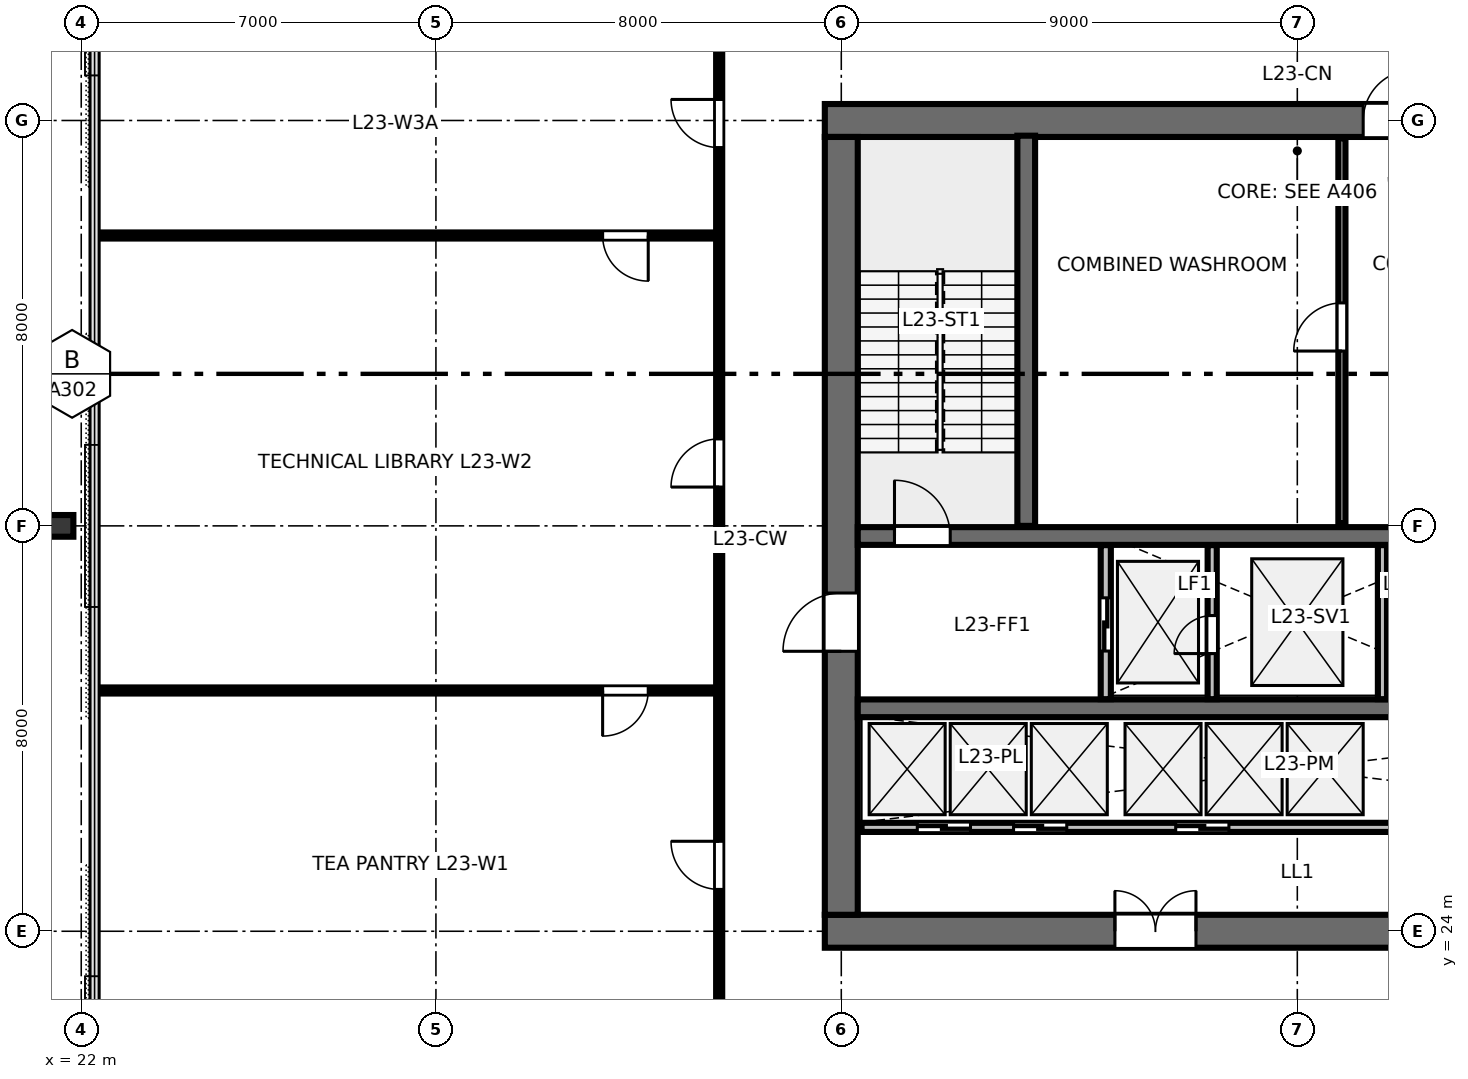
"""IFC4 building model, lengths in metres.
Left out: names, types, materials, properties, quantities, classifications, styles, units other than length and angle.
Written with IfcOpenShell. Run it as: python <this file> out.ifc"""

import sys

from ifc_helpers import new_model, si_unit, direction, frame, frame_2d, origin, origin_2d, place, context, subcontext, project, spatial, rectangle, i_section, extrude, element, fill, save


model = new_model("IFC4")
c1 = context("Model", 3, precision=1e-05, world=origin(), true_north=direction((0.0, 1.0)))
c2 = subcontext(c1, "Body", "Model", "MODEL_VIEW")
j1 = project(units=[si_unit("LENGTHUNIT", "METRE"), si_unit("PLANEANGLEUNIT", "RADIAN")], contexts=[c1])
p1 = place(None, origin())
s1 = spatial("IfcSite", under=j1, at=p1, CompositionType="ELEMENT")
p2 = place(p1, origin())
s2 = spatial("IfcBuilding", under=s1, at=p2, CompositionType="ELEMENT")
p3 = place(p2, frame((0.0, 0.0, 90.4)))
s3 = spatial("IfcBuildingStorey", under=s2, at=p3, CompositionType="ELEMENT", Elevation=90.4)
p4 = place(p3, frame((36.675, 24.0, 0.0), z_axis=(0.0, 0.0, 1.0), x_axis=(1.0, 0.0, 0.0)))
e1 = element("IfcWall", 1, at=p4, inside=s3, PredefinedType="SHEAR", context=c2, shape_type="SweptSolid", body=[
    extrude(rectangle(XDim=18.65, YDim=0.65, at=frame_2d((9.325, 0.0))), origin(), (0.0, 0.0, 1.0), 4.56),
])
p5 = place(p4, frame((5.725, 0.0, 0.0)))
e2 = element("IfcOpeningElement", 2, at=p5, cuts=e1, PredefinedType="OPENING", context=c2, shape_type="SweptSolid", body=[
    extrude(rectangle(XDim=1.6, YDim=2.15, at=frame_2d((0.8, 1.075))), frame((0.0, 0.335, 0.0), z_axis=(0.0, -1.0, 0.0), x_axis=(1.0, 0.0, 0.0)), (0.0, 0.0, 1.0), 0.67),
])
p6 = place(p4, frame((12.125, 0.0, 0.0)))
e3 = element("IfcOpeningElement", 3, at=p6, cuts=e1, PredefinedType="OPENING", context=c2, shape_type="SweptSolid", body=[
    extrude(rectangle(XDim=1.6, YDim=2.15, at=frame_2d((0.8, 1.075))), frame((0.0, 0.335, 0.0), z_axis=(0.0, -1.0, 0.0), x_axis=(1.0, 0.0, 0.0)), (0.0, 0.0, 1.0), 0.67),
])
p7 = place(p3, frame((36.675, 40.0, 0.0), z_axis=(0.0, 0.0, 1.0), x_axis=(1.0, 0.0, 0.0)))
e4 = element("IfcWall", 4, at=p7, inside=s3, PredefinedType="SHEAR", context=c2, shape_type="SweptSolid", body=[
    extrude(rectangle(XDim=18.65, YDim=0.65, at=frame_2d((9.325, 0.0))), origin(), (0.0, 0.0, 1.0), 4.56),
])
p8 = place(p7, frame((10.625, 0.0, 0.0)))
e5 = element("IfcOpeningElement", 5, at=p8, cuts=e4, PredefinedType="OPENING", context=c2, shape_type="SweptSolid", body=[
    extrude(rectangle(XDim=1.0, YDim=2.15, at=frame_2d((0.5, 1.075))), frame((0.0, 0.335, 0.0), z_axis=(0.0, -1.0, 0.0), x_axis=(1.0, 0.0, 0.0)), (0.0, 0.0, 1.0), 0.67),
])
p9 = place(p3, frame((37.0, 24.325, 0.0), z_axis=(0.0, 0.0, 1.0), x_axis=(0.0, 1.0, 0.0)))
e6 = element("IfcWall", 6, at=p9, inside=s3, PredefinedType="SHEAR", context=c2, shape_type="SweptSolid", body=[
    extrude(rectangle(XDim=15.35, YDim=0.65, at=frame_2d((7.675, 0.0))), origin(), (0.0, 0.0, 1.0), 4.56),
])
p10 = place(p9, frame((5.2, 0.0, 0.0)))
e7 = element("IfcOpeningElement", 7, at=p10, cuts=e6, PredefinedType="OPENING", context=c2, shape_type="SweptSolid", body=[
    extrude(rectangle(XDim=1.15, YDim=2.15, at=frame_2d((0.575, 1.075))), frame((0.0, 0.335, 0.0), z_axis=(0.0, -1.0, 0.0), x_axis=(1.0, 0.0, 0.0)), (0.0, 0.0, 1.0), 0.67),
])
p11 = place(p3, frame((37.325, 31.8, 0.0), z_axis=(0.0, 0.0, 1.0), x_axis=(1.0, 0.0, 0.0)))
e8 = element("IfcWall", 8, at=p11, inside=s3, PredefinedType="SHEAR", context=c2, shape_type="SweptSolid", body=[
    extrude(rectangle(XDim=17.35, YDim=0.35, at=frame_2d((8.675, 0.0))), origin(), (0.0, 0.0, 1.0), 4.56),
])
p12 = place(p11, frame((0.725, 0.0, 0.0)))
e9 = element("IfcOpeningElement", 9, at=p12, cuts=e8, PredefinedType="OPENING", context=c2, shape_type="SweptSolid", body=[
    extrude(rectangle(XDim=1.1, YDim=2.15, at=frame_2d((0.55, 1.075))), frame((0.0, 0.185, 0.0), z_axis=(0.0, -1.0, 0.0), x_axis=(1.0, 0.0, 0.0)), (0.0, 0.0, 1.0), 0.37),
])
p13 = place(p11, frame((14.625, 0.0, 0.0)))
e10 = element("IfcOpeningElement", 10, at=p13, cuts=e8, PredefinedType="OPENING", context=c2, shape_type="SweptSolid", body=[
    extrude(rectangle(XDim=1.1, YDim=2.15, at=frame_2d((0.55, 1.075))), frame((0.0, 0.185, 0.0), z_axis=(0.0, -1.0, 0.0), x_axis=(1.0, 0.0, 0.0)), (0.0, 0.0, 1.0), 0.37),
])
p14 = place(p3, frame((37.325, 28.4, 0.0), z_axis=(0.0, 0.0, 1.0), x_axis=(1.0, 0.0, 0.0)))
e11 = element("IfcWall", 11, at=p14, inside=s3, PredefinedType="SHEAR", context=c2, shape_type="SweptSolid", body=[
    extrude(rectangle(XDim=17.35, YDim=0.35, at=frame_2d((8.675, 0.0))), origin(), (0.0, 0.0, 1.0), 4.56),
])
p15 = place(p3, frame((21.603, 32.0, 0.0), z_axis=(0.047509227082, 0.0, 0.998870799124), x_axis=(-0.998870799124, 0.0, 0.047509227082)))
e12 = element("IfcColumn", 12, at=p15, inside=s3, PredefinedType="COLUMN", context=c2, shape_type="SweptSolid", body=[
    extrude(i_section(OverallWidth=0.428, OverallDepth=0.483, WebThickness=0.051, FlangeThickness=0.082, FilletRadius=0.025, at=origin_2d()), origin(), (0.0, 0.0, 1.0), 4.563),
])
p16 = place(p3, frame((40.65, 32.0, 0.0), z_axis=(0.0, 0.0, 1.0), x_axis=(0.0, 1.0, 0.0)))
e13 = element("IfcWall", 13, at=p16, inside=s3, PredefinedType="SHEAR", context=c2, shape_type="SweptSolid", body=[
    extrude(rectangle(XDim=7.7, YDim=0.35, at=frame_2d((3.85, 0.0))), origin(), (0.0, 0.0, 1.0), 4.8),
])
p17 = place(p3, frame((46.88, 32.05, 0.0), z_axis=(0.0, 0.0, 1.0), x_axis=(0.0, 1.0, 0.0)))
e14 = element("IfcWall", 14, at=p17, inside=s3, PredefinedType="PARTITIONING", context=c2, shape_type="SweptSolid", body=[
    extrude(rectangle(XDim=7.6, YDim=0.14, at=frame_2d((3.8, 0.0))), origin(), (0.0, 0.0, 1.0), 4.56),
])
p18 = place(p17, frame((3.4, 0.0, 0.0)))
e15 = element("IfcOpeningElement", 15, at=p18, cuts=e14, PredefinedType="OPENING", context=c2, shape_type="SweptSolid", body=[
    extrude(rectangle(XDim=0.95, YDim=2.15, at=frame_2d((0.475, 1.075))), frame((0.0, 0.08, 0.0), z_axis=(0.0, -1.0, 0.0), x_axis=(1.0, 0.0, 0.0)), (0.0, 0.0, 1.0), 0.16),
])
p19 = place(p3, frame((42.22, 28.58, 0.0), z_axis=(0.0, 0.0, 1.0), x_axis=(0.0, 1.0, 0.0)))
e16 = element("IfcWall", 16, at=p19, inside=s3, PredefinedType="PARTITIONING", context=c2, shape_type="SweptSolid", body=[
    extrude(rectangle(XDim=3.04, YDim=0.2, at=frame_2d((1.52, 0.0))), origin(), (0.0, 0.0, 1.0), 4.56),
])
p20 = place(p19, frame((0.95, 0.0, 0.0)))
e17 = element("IfcOpeningElement", 17, at=p20, cuts=e16, PredefinedType="OPENING", context=c2, shape_type="SweptSolid", body=[
    extrude(rectangle(XDim=1.05, YDim=2.15, at=frame_2d((0.525, 1.075))), frame((0.0, 0.11, 0.0), z_axis=(0.0, -1.0, 0.0), x_axis=(1.0, 0.0, 0.0)), (0.0, 0.0, 1.0), 0.22),
])
p21 = place(p3, frame((44.32, 28.58, 0.0), z_axis=(0.0, 0.0, 1.0), x_axis=(0.0, 1.0, 0.0)))
e18 = element("IfcWall", 18, at=p21, inside=s3, PredefinedType="PARTITIONING", context=c2, shape_type="SweptSolid", body=[
    extrude(rectangle(XDim=3.04, YDim=0.18, at=frame_2d((1.52, 0.0))), origin(), (0.0, 0.0, 1.0), 4.56),
])
p22 = place(p21, frame((0.9, 0.0, 0.0)))
e19 = element("IfcOpeningElement", 19, at=p22, cuts=e18, PredefinedType="OPENING", context=c2, shape_type="SweptSolid", body=[
    extrude(rectangle(XDim=0.75, YDim=2.0, at=frame_2d((0.375, 1.0))), frame((0.0, 0.1, 0.0), z_axis=(0.0, -1.0, 0.0), x_axis=(1.0, 0.0, 0.0)), (0.0, 0.0, 1.0), 0.2),
])
p23 = place(p3, frame((47.68, 28.58, 0.0), z_axis=(0.0, 0.0, 1.0), x_axis=(0.0, 1.0, 0.0)))
e20 = element("IfcWall", 20, at=p23, inside=s3, PredefinedType="PARTITIONING", context=c2, shape_type="SweptSolid", body=[
    extrude(rectangle(XDim=3.04, YDim=0.18, at=frame_2d((1.52, 0.0))), origin(), (0.0, 0.0, 1.0), 4.56),
])
p24 = place(p3, frame((37.4, 26.05, 0.0), z_axis=(0.0, 0.0, 1.0), x_axis=(1.0, 0.0, 0.0)))
e21 = element("IfcWall", 21, at=p24, inside=s3, PredefinedType="PARTITIONING", context=c2, shape_type="SweptSolid", body=[
    extrude(rectangle(XDim=17.2, YDim=0.18, at=frame_2d((8.6, 0.0))), origin(), (0.0, 0.0, 1.0), 4.56),
])
p25 = place(p24, frame((1.1, 0.0, 0.0)))
e22 = element("IfcOpeningElement", 22, at=p25, cuts=e21, PredefinedType="OPENING", context=c2, shape_type="SweptSolid", body=[
    extrude(rectangle(XDim=1.05, YDim=2.15, at=frame_2d((0.525, 1.075))), frame((0.0, 0.1, 0.0), z_axis=(0.0, -1.0, 0.0), x_axis=(1.0, 0.0, 0.0)), (0.0, 0.0, 1.0), 0.2),
])
p26 = place(p24, frame((3.0, 0.0, 0.0)))
e23 = element("IfcOpeningElement", 23, at=p26, cuts=e21, PredefinedType="OPENING", context=c2, shape_type="SweptSolid", body=[
    extrude(rectangle(XDim=1.05, YDim=2.15, at=frame_2d((0.525, 1.075))), frame((0.0, 0.1, 0.0), z_axis=(0.0, -1.0, 0.0), x_axis=(1.0, 0.0, 0.0)), (0.0, 0.0, 1.0), 0.2),
])
p27 = place(p24, frame((11.4, 0.0, 0.0)))
e24 = element("IfcOpeningElement", 24, at=p27, cuts=e21, PredefinedType="OPENING", context=c2, shape_type="SweptSolid", body=[
    extrude(rectangle(XDim=1.05, YDim=2.15, at=frame_2d((0.525, 1.075))), frame((0.0, 0.1, 0.0), z_axis=(0.0, -1.0, 0.0), x_axis=(1.0, 0.0, 0.0)), (0.0, 0.0, 1.0), 0.2),
])
p28 = place(p24, frame((6.2, 0.0, 0.0)))
e25 = element("IfcOpeningElement", 25, at=p28, cuts=e21, PredefinedType="OPENING", context=c2, shape_type="SweptSolid", body=[
    extrude(rectangle(XDim=1.05, YDim=2.15, at=frame_2d((0.525, 1.075))), frame((0.0, 0.1, 0.0), z_axis=(0.0, -1.0, 0.0), x_axis=(1.0, 0.0, 0.0)), (0.0, 0.0, 1.0), 0.2),
])
p29 = place(p3, frame((34.59, 28.752, 0.0), z_axis=(0.0, 0.0, 1.0), x_axis=(-1.0, 0.0, 0.0)))
e26 = element("IfcWall", 26, at=p29, inside=s3, PredefinedType="PARTITIONING", context=c2, shape_type="SweptSolid", body=[
    extrude(rectangle(XDim=12.327, YDim=0.12, at=frame_2d((6.164, 0.0))), origin(), (0.0, 0.0, 1.0), 3.84),
])
p30 = place(p29, frame((1.4, 0.0, 0.0)))
e27 = element("IfcOpeningElement", 27, at=p30, cuts=e26, PredefinedType="OPENING", context=c2, shape_type="SweptSolid", body=[
    extrude(rectangle(XDim=0.9, YDim=2.15, at=frame_2d((0.45, 1.075))), frame((0.0, 0.07, 0.0), z_axis=(0.0, -1.0, 0.0), x_axis=(1.0, 0.0, 0.0)), (0.0, 0.0, 1.0), 0.14),
])
p31 = place(p3, frame((34.59, 37.73, 0.0), z_axis=(0.0, 0.0, 1.0), x_axis=(-1.0, 0.0, 0.0)))
e28 = element("IfcWall", 28, at=p31, inside=s3, PredefinedType="PARTITIONING", context=c2, shape_type="SweptSolid", body=[
    extrude(rectangle(XDim=12.327, YDim=0.12, at=frame_2d((6.164, 0.0))), origin(), (0.0, 0.0, 1.0), 3.84),
])
p32 = place(p31, frame((1.4, 0.0, 0.0)))
e29 = element("IfcOpeningElement", 29, at=p32, cuts=e28, PredefinedType="OPENING", context=c2, shape_type="SweptSolid", body=[
    extrude(rectangle(XDim=0.9, YDim=2.15, at=frame_2d((0.45, 1.075))), frame((0.0, 0.07, 0.0), z_axis=(0.0, -1.0, 0.0), x_axis=(1.0, 0.0, 0.0)), (0.0, 0.0, 1.0), 0.14),
])
p33 = place(p3, frame((34.59, 21.65, 0.0), z_axis=(0.0, 0.0, 1.0), x_axis=(0.0, 1.0, 0.0)))
e30 = element("IfcWall", 30, at=p33, inside=s3, PredefinedType="PARTITIONING", context=c2, shape_type="SweptSolid", body=[
    extrude(rectangle(XDim=20.7, YDim=0.12, at=frame_2d((10.35, 0.0))), origin(), (0.0, 0.0, 1.0), 3.84),
])
p34 = place(p33, frame((3.176, 0.0, 0.0)))
e31 = element("IfcOpeningElement", 31, at=p34, cuts=e30, PredefinedType="OPENING", context=c2, shape_type="SweptSolid", body=[
    extrude(rectangle(XDim=0.95, YDim=2.15, at=frame_2d((0.475, 1.075))), frame((0.0, 0.07, 0.0), z_axis=(0.0, -1.0, 0.0), x_axis=(1.0, 0.0, 0.0)), (0.0, 0.0, 1.0), 0.14),
])
p35 = place(p33, frame((11.116, 0.0, 0.0)))
e32 = element("IfcOpeningElement", 32, at=p35, cuts=e30, PredefinedType="OPENING", context=c2, shape_type="SweptSolid", body=[
    extrude(rectangle(XDim=0.95, YDim=2.15, at=frame_2d((0.475, 1.075))), frame((0.0, 0.07, 0.0), z_axis=(0.0, -1.0, 0.0), x_axis=(1.0, 0.0, 0.0)), (0.0, 0.0, 1.0), 0.14),
])
p36 = place(p33, frame((17.815, 0.0, 0.0)))
e33 = element("IfcOpeningElement", 33, at=p36, cuts=e30, PredefinedType="OPENING", context=c2, shape_type="SweptSolid", body=[
    extrude(rectangle(XDim=0.95, YDim=2.15, at=frame_2d((0.475, 1.075))), frame((0.0, 0.07, 0.0), z_axis=(0.0, -1.0, 0.0), x_axis=(1.0, 0.0, 0.0)), (0.0, 0.0, 1.0), 0.14),
])
p37 = place(p12, origin())
e34 = element("IfcDoor", 34, at=p37, inside=s3, OperationType="SINGLE_SWING_LEFT", PredefinedType="DOOR", context=c2, shape_type="SweptSolid", body=[
    extrude(rectangle(XDim=1.1, YDim=2.15, at=frame_2d((0.55, 1.075))), frame((0.0, 0.025, 0.0), z_axis=(0.0, -1.0, 0.0), x_axis=(1.0, 0.0, 0.0)), (0.0, 0.0, 1.0), 0.05),
])
fill(e9, e34)
p38 = place(p8, origin())
e35 = element("IfcDoor", 35, at=p38, inside=s3, OperationType="SINGLE_SWING_RIGHT", PredefinedType="DOOR", context=c2, shape_type="SweptSolid", body=[
    extrude(rectangle(XDim=1.0, YDim=2.15, at=frame_2d((0.5, 1.075))), frame((0.0, 0.025, 0.0), z_axis=(0.0, -1.0, 0.0), x_axis=(1.0, 0.0, 0.0)), (0.0, 0.0, 1.0), 0.05),
])
fill(e5, e35)
p39 = place(p10, origin())
e36 = element("IfcDoor", 36, at=p39, inside=s3, OperationType="SINGLE_SWING_LEFT", PredefinedType="DOOR", context=c2, shape_type="SweptSolid", body=[
    extrude(rectangle(XDim=1.15, YDim=2.15, at=frame_2d((0.575, 1.075))), frame((0.0, 0.025, 0.0), z_axis=(0.0, -1.0, 0.0), x_axis=(1.0, 0.0, 0.0)), (0.0, 0.0, 1.0), 0.05),
])
fill(e7, e36)
p40 = place(p5, origin())
e37 = element("IfcDoor", 37, at=p40, inside=s3, OperationType="DOUBLE_DOOR_SINGLE_SWING", PredefinedType="DOOR", context=c2, shape_type="SweptSolid", body=[
    extrude(rectangle(XDim=1.6, YDim=2.15, at=frame_2d((0.8, 1.075))), frame((0.0, 0.025, 0.0), z_axis=(0.0, -1.0, 0.0), x_axis=(1.0, 0.0, 0.0)), (0.0, 0.0, 1.0), 0.05),
])
fill(e2, e37)
p41 = place(p18, origin())
e38 = element("IfcDoor", 38, at=p41, inside=s3, OperationType="SINGLE_SWING_LEFT", PredefinedType="DOOR", context=c2, shape_type="SweptSolid", body=[
    extrude(rectangle(XDim=0.95, YDim=2.15, at=frame_2d((0.475, 1.075))), frame((0.0, 0.025, 0.0), z_axis=(0.0, -1.0, 0.0), x_axis=(1.0, 0.0, 0.0)), (0.0, 0.0, 1.0), 0.05),
])
fill(e15, e38)
p42 = place(p20, origin())
e39 = element("IfcDoor", 39, at=p42, inside=s3, OperationType="SLIDING_TO_LEFT", PredefinedType="DOOR", context=c2, shape_type="SweptSolid", body=[
    extrude(rectangle(XDim=1.05, YDim=2.15, at=frame_2d((0.525, 1.075))), frame((0.0, 0.025, 0.0), z_axis=(0.0, -1.0, 0.0), x_axis=(1.0, 0.0, 0.0)), (0.0, 0.0, 1.0), 0.05),
])
fill(e17, e39)
p43 = place(p25, origin())
e40 = element("IfcDoor", 40, at=p43, inside=s3, OperationType="SLIDING_TO_LEFT", PredefinedType="DOOR", context=c2, shape_type="SweptSolid", body=[
    extrude(rectangle(XDim=1.05, YDim=2.15, at=frame_2d((0.525, 1.075))), frame((0.0, 0.025, 0.0), z_axis=(0.0, -1.0, 0.0), x_axis=(1.0, 0.0, 0.0)), (0.0, 0.0, 1.0), 0.05),
])
fill(e22, e40)
p44 = place(p26, origin())
e41 = element("IfcDoor", 41, at=p44, inside=s3, OperationType="SLIDING_TO_RIGHT", PredefinedType="DOOR", context=c2, shape_type="SweptSolid", body=[
    extrude(rectangle(XDim=1.05, YDim=2.15, at=frame_2d((0.525, 1.075))), frame((0.0, 0.025, 0.0), z_axis=(0.0, -1.0, 0.0), x_axis=(1.0, 0.0, 0.0)), (0.0, 0.0, 1.0), 0.05),
])
fill(e23, e41)
p45 = place(p28, origin())
e42 = element("IfcDoor", 42, at=p45, inside=s3, OperationType="SLIDING_TO_LEFT", PredefinedType="DOOR", context=c2, shape_type="SweptSolid", body=[
    extrude(rectangle(XDim=1.05, YDim=2.15, at=frame_2d((0.525, 1.075))), frame((0.0, 0.025, 0.0), z_axis=(0.0, -1.0, 0.0), x_axis=(1.0, 0.0, 0.0)), (0.0, 0.0, 1.0), 0.05),
])
fill(e25, e42)
p46 = place(p30, origin())
e43 = element("IfcDoor", 43, at=p46, inside=s3, OperationType="SINGLE_SWING_RIGHT", PredefinedType="DOOR", context=c2, shape_type="SweptSolid", body=[
    extrude(rectangle(XDim=0.9, YDim=2.15, at=frame_2d((0.45, 1.075))), frame((0.0, 0.025, 0.0), z_axis=(0.0, -1.0, 0.0), x_axis=(1.0, 0.0, 0.0)), (0.0, 0.0, 1.0), 0.05),
])
fill(e27, e43)
p47 = place(p32, origin())
e44 = element("IfcDoor", 44, at=p47, inside=s3, OperationType="SINGLE_SWING_LEFT", PredefinedType="DOOR", context=c2, shape_type="SweptSolid", body=[
    extrude(rectangle(XDim=0.9, YDim=2.15, at=frame_2d((0.45, 1.075))), frame((0.0, 0.025, 0.0), z_axis=(0.0, -1.0, 0.0), x_axis=(1.0, 0.0, 0.0)), (0.0, 0.0, 1.0), 0.05),
])
fill(e29, e44)
p48 = place(p34, origin())
e45 = element("IfcDoor", 45, at=p48, inside=s3, OperationType="SINGLE_SWING_RIGHT", PredefinedType="DOOR", context=c2, shape_type="SweptSolid", body=[
    extrude(rectangle(XDim=0.95, YDim=2.15, at=frame_2d((0.475, 1.075))), frame((0.0, 0.025, 0.0), z_axis=(0.0, -1.0, 0.0), x_axis=(1.0, 0.0, 0.0)), (0.0, 0.0, 1.0), 0.05),
])
fill(e31, e45)
p49 = place(p35, origin())
e46 = element("IfcDoor", 46, at=p49, inside=s3, OperationType="SINGLE_SWING_LEFT", PredefinedType="DOOR", context=c2, shape_type="SweptSolid", body=[
    extrude(rectangle(XDim=0.95, YDim=2.15, at=frame_2d((0.475, 1.075))), frame((0.0, 0.025, 0.0), z_axis=(0.0, -1.0, 0.0), x_axis=(1.0, 0.0, 0.0)), (0.0, 0.0, 1.0), 0.05),
])
fill(e32, e46)
p50 = place(p36, origin())
e47 = element("IfcDoor", 47, at=p50, inside=s3, OperationType="SINGLE_SWING_RIGHT", PredefinedType="DOOR", context=c2, shape_type="SweptSolid", body=[
    extrude(rectangle(XDim=0.95, YDim=2.15, at=frame_2d((0.475, 1.075))), frame((0.0, 0.025, 0.0), z_axis=(0.0, -1.0, 0.0), x_axis=(1.0, 0.0, 0.0)), (0.0, 0.0, 1.0), 0.05),
])
fill(e33, e47)
p51 = place(p22, origin())
e48 = element("IfcDoor", 48, at=p51, inside=s3, OperationType="SINGLE_SWING_LEFT", PredefinedType="TRAPDOOR", context=c2, shape_type="SweptSolid", body=[
    extrude(rectangle(XDim=0.75, YDim=2.0, at=frame_2d((0.375, 1.0))), frame((0.0, 0.025, 0.0), z_axis=(0.0, -1.0, 0.0), x_axis=(1.0, 0.0, 0.0)), (0.0, 0.0, 1.0), 0.05),
])
fill(e19, e48)
save(model, sys.argv[1])
